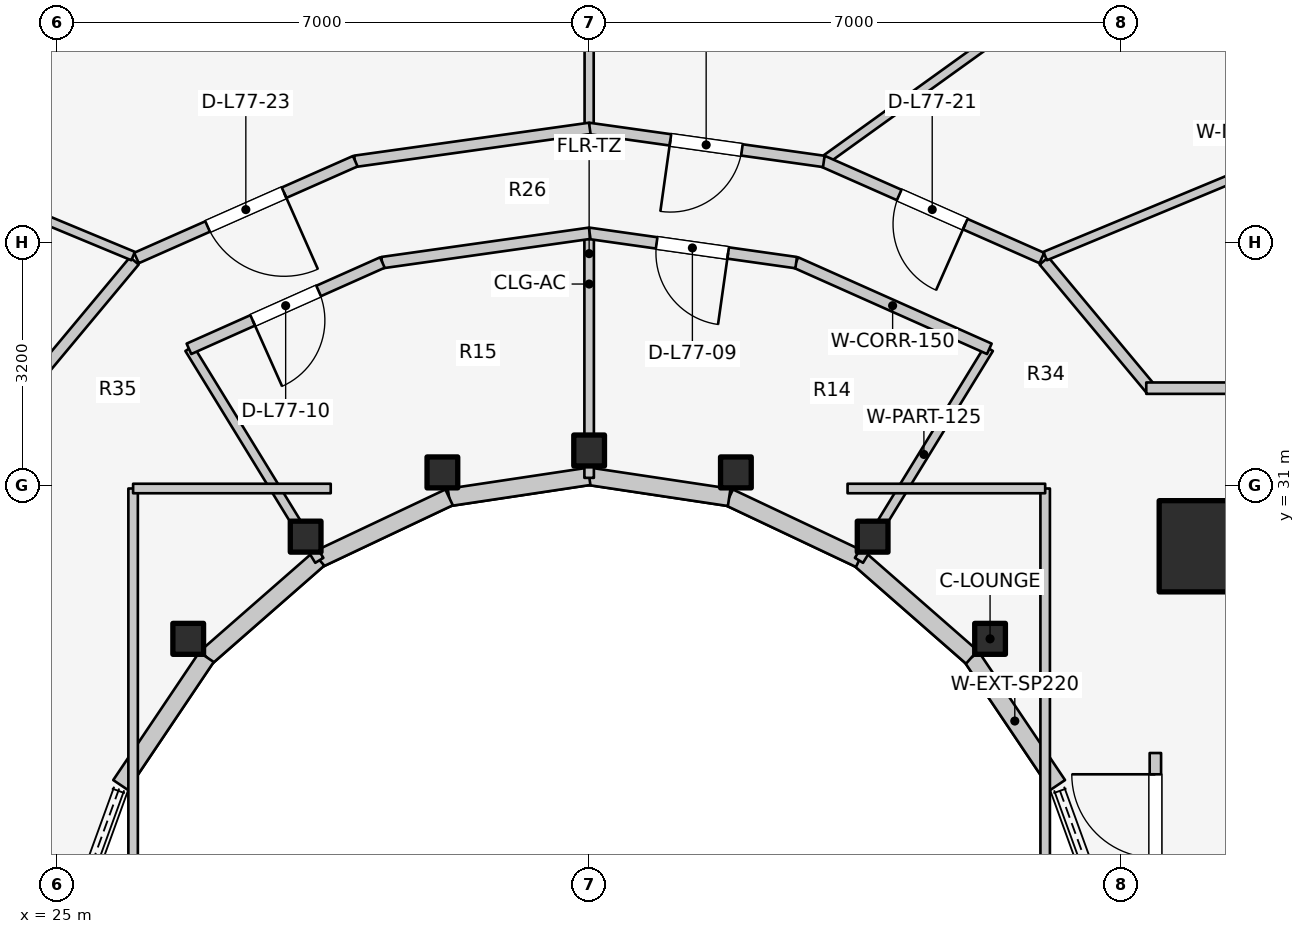
"""IFC4 building model, lengths in metres.
Left out: names, types, materials, properties, quantities, classifications, styles, units other than length and angle.
Written with IfcOpenShell. Run it as: python <this file> out.ifc"""

import sys

from ifc_helpers import new_model, si_unit, direction, frame, frame_2d, origin, origin_2d, place, context, subcontext, project, spatial, rectangle, i_section, extrude, element, fill, save


model = new_model("IFC4")
c1 = context("Model", 3, precision=1e-05, world=origin(), true_north=direction((0.0, 1.0)))
c2 = subcontext(c1, "Body", "Model", "MODEL_VIEW")
j1 = project(units=[si_unit("LENGTHUNIT", "METRE"), si_unit("PLANEANGLEUNIT", "RADIAN")], contexts=[c1])
p1 = place(None, origin())
s1 = spatial("IfcSite", under=j1, at=p1, CompositionType="ELEMENT")
p2 = place(p1, origin())
s2 = spatial("IfcBuilding", under=s1, at=p2, CompositionType="ELEMENT")
p3 = place(p2, frame((0.0, 0.0, 253.2)))
s3 = spatial("IfcBuildingStorey", under=s2, at=p3, CompositionType="ELEMENT", Elevation=253.2)
p4 = place(p3, frame((39.85, 30.35, 0.0), z_axis=(0.0, 0.0, 1.0), x_axis=(1.0, 0.0, 0.0)))
e1 = element("IfcWall", 1, at=p4, inside=s3, PredefinedType="SHEAR", context=c2, shape_type="SweptSolid", body=[
    extrude(rectangle(XDim=4.5, YDim=0.45, at=frame_2d((2.25, 0.0))), origin(), (0.0, 0.0, 1.0), 3.6),
])
p5 = place(p3, frame((40.1, 30.2, 0.0), z_axis=(0.0, 0.0, 1.0), x_axis=(1.0, 0.0, 0.0)))
e2 = element("IfcColumn", 2, at=p5, inside=s3, PredefinedType="COLUMN", context=c2, shape_type="SweptSolid", body=[
    extrude(rectangle(XDim=1.2, YDim=1.2, at=origin_2d()), origin(), (0.0, 0.0, 1.0), 3.6),
])
for number, where, z_axis, x_axis in (
    (3, (37.275, 28.982, 0.0), (0.0, 0.0, 1.0), (1.0, 0.0, 0.0)),
    (4, (35.73, 30.327, 0.0), (0.0, 0.0, 1.0), (1.0, 0.0, 0.0)),
    (5, (33.931, 31.172, 0.0), (0.0, 0.0, 1.0), (1.0, 0.0, 0.0)),
    (6, (32.0, 31.46, 0.0), (0.0, 0.0, 1.0), (1.0, 0.0, 0.0)),
    (7, (30.069, 31.172, 0.0), (0.0, 0.0, 1.0), (1.0, 0.0, 0.0)),
    (8, (28.27, 30.327, 0.0), (0.0, 0.0, 1.0), (1.0, 0.0, 0.0)),
    (9, (26.725, 28.982, 0.0), (0.0, 0.0, 1.0), (1.0, 0.0, 0.0)),
):
    element("IfcColumn", number, at=place(p3, frame(where, z_axis=z_axis, x_axis=x_axis)), inside=s3, PredefinedType="COLUMN", context=c2, shape_type="SweptSolid", body=[
        extrude(i_section(OverallWidth=0.404, OverallDepth=0.407, WebThickness=0.027, FlangeThickness=0.044, FilletRadius=0.025, at=origin_2d()), origin(), (0.0, 0.0, 1.0), 3.6),
    ])
p6 = place(p3, frame((38.166, 27.06, 0.0), z_axis=(0.0, 0.0, 1.0), x_axis=(-0.558197800898, 0.829707909492, 0.0)))
e10 = element("IfcWall", 10, at=p6, inside=s3, PredefinedType="STANDARD", context=c2, shape_type="SweptSolid", body=[
    extrude(rectangle(XDim=2.027, YDim=0.23, at=frame_2d((1.013, 0.0))), origin(), (0.0, 0.0, 1.0), 2.6),
])
p7 = place(p3, frame((37.035, 28.742, 0.0), z_axis=(0.0, 0.0, 1.0), x_axis=(-0.752576694707, 0.658504607869, 0.0)))
e11 = element("IfcWall", 11, at=p7, inside=s3, PredefinedType="STANDARD", context=c2, shape_type="SweptSolid", body=[
    extrude(rectangle(XDim=1.959, YDim=0.23, at=frame_2d((0.98, 0.0))), origin(), (0.0, 0.0, 1.0), 2.6),
])
p8 = place(p3, frame((35.56, 30.032, 0.0), z_axis=(0.0, 0.0, 1.0), x_axis=(-0.904179699603, 0.427152280606, 0.0)))
e12 = element("IfcWall", 12, at=p8, inside=s3, PredefinedType="STANDARD", context=c2, shape_type="SweptSolid", body=[
    extrude(rectangle(XDim=1.899, YDim=0.23, at=frame_2d((0.95, 0.0))), origin(), (0.0, 0.0, 1.0), 2.6),
])
for number, where, z_axis, x_axis in (
    (13, (33.843, 30.843, 0.0), (0.0, 0.0, 1.0), (-0.989, 0.149, 0.0)),
    (14, (32.0, 31.12, 0.0), (0.0, 0.0, 1.0), (-0.989, -0.149, 0.0)),
):
    element("IfcWall", number, at=place(p3, frame(where, z_axis=z_axis, x_axis=x_axis)), inside=s3, PredefinedType="STANDARD", context=c2, shape_type="SweptSolid", body=[
        extrude(rectangle(XDim=1.864, YDim=0.23, at=frame_2d((0.932, 0.0))), origin(), (0.0, 0.0, 1.0), 2.6),
    ])
p9 = place(p3, frame((30.157, 30.843, 0.0), z_axis=(0.0, 0.0, 1.0), x_axis=(-0.904179699603, -0.427152280606, 0.0)))
e15 = element("IfcWall", 15, at=p9, inside=s3, PredefinedType="STANDARD", context=c2, shape_type="SweptSolid", body=[
    extrude(rectangle(XDim=1.899, YDim=0.23, at=frame_2d((0.95, 0.0))), origin(), (0.0, 0.0, 1.0), 2.6),
])
p10 = place(p3, frame((28.44, 30.032, 0.0), z_axis=(0.0, 0.0, 1.0), x_axis=(-0.752576694707, -0.658504607869, 0.0)))
e16 = element("IfcWall", 16, at=p10, inside=s3, PredefinedType="STANDARD", context=c2, shape_type="SweptSolid", body=[
    extrude(rectangle(XDim=1.959, YDim=0.23, at=frame_2d((0.98, 0.0))), origin(), (0.0, 0.0, 1.0), 2.6),
])
p11 = place(p3, frame((26.965, 28.742, 0.0), z_axis=(0.0, 0.0, 1.0), x_axis=(-0.558197800898, -0.829707909492, 0.0)))
e17 = element("IfcWall", 17, at=p11, inside=s3, PredefinedType="STANDARD", context=c2, shape_type="SweptSolid", body=[
    extrude(rectangle(XDim=2.027, YDim=0.23, at=frame_2d((1.013, 0.0))), origin(), (0.0, 0.0, 1.0), 2.6),
])
p12 = place(p3, frame((39.45, 24.08, 0.0), z_axis=(0.0, 0.0, 1.0), x_axis=(0.0, 1.0, 0.0)))
e18 = element("IfcWall", 18, at=p12, inside=s3, PredefinedType="PARTITIONING", context=c2, shape_type="SweptSolid", body=[
    extrude(rectangle(XDim=3.4, YDim=0.15, at=frame_2d((1.7, 0.0))), origin(), (0.0, 0.0, 1.0), 3.295),
])
p13 = place(p12, frame((2.02, 0.0, 0.0)))
e19 = element("IfcOpeningElement", 19, at=p13, cuts=e18, PredefinedType="OPENING", context=c2, shape_type="SweptSolid", body=[
    extrude(rectangle(XDim=1.1, YDim=2.1, at=frame_2d((0.55, 1.05))), frame((0.0, 0.085, 0.0), z_axis=(0.0, -1.0, 0.0), x_axis=(1.0, 0.0, 0.0)), (0.0, 0.0, 1.0), 0.17),
])
p14 = place(p3, frame((35.55, 30.015, 0.0), z_axis=(0.0, 0.0, 1.0), x_axis=(0.522763432117, 0.852477796802, 0.0)))
e20 = element("IfcWall", 20, at=p14, inside=s3, PredefinedType="PARTITIONING", context=c2, shape_type="SweptSolid", body=[
    extrude(rectangle(XDim=3.269, YDim=0.125, at=frame_2d((1.635, 0.0))), origin(), (0.0, 0.0, 1.0), 2.672),
])
p15 = place(p3, frame((32.0, 31.1, 0.0), z_axis=(0.0, 0.0, 1.0), x_axis=(0.0, 1.0, 0.0)))
e21 = element("IfcWall", 21, at=p15, inside=s3, PredefinedType="PARTITIONING", context=c2, shape_type="SweptSolid", body=[
    extrude(rectangle(XDim=3.218, YDim=0.125, at=frame_2d((1.609, 0.0))), origin(), (0.0, 0.0, 1.0), 2.672),
])
p16 = place(p3, frame((28.45, 30.015, 0.0), z_axis=(0.0, 0.0, 1.0), x_axis=(-0.522763432117, 0.852477796802, 0.0)))
e22 = element("IfcWall", 22, at=p16, inside=s3, PredefinedType="PARTITIONING", context=c2, shape_type="SweptSolid", body=[
    extrude(rectangle(XDim=3.269, YDim=0.125, at=frame_2d((1.635, 0.0))), origin(), (0.0, 0.0, 1.0), 2.672),
])
p17 = place(p3, frame((37.265, 32.798, 0.0), z_axis=(0.0, 0.0, 1.0), x_axis=(-0.913254317828, 0.407389924971, 0.0)))
e23 = element("IfcWall", 23, at=p17, inside=s3, PredefinedType="PARTITIONING", context=c2, shape_type="SweptSolid", body=[
    extrude(rectangle(XDim=2.787, YDim=0.15, at=frame_2d((1.393, 0.0))), origin(), (0.0, 0.0, 1.0), 2.823),
])
p18 = place(p3, frame((34.724, 33.932, 0.0), z_axis=(0.0, 0.0, 1.0), x_axis=(-0.990150268487, 0.140008734782, 0.0)))
e24 = element("IfcWall", 24, at=p18, inside=s3, PredefinedType="PARTITIONING", context=c2, shape_type="SweptSolid", body=[
    extrude(rectangle(XDim=2.759, YDim=0.15, at=frame_2d((1.379, 0.0))), origin(), (0.0, 0.0, 1.0), 2.823),
])
p19 = place(p18, frame((0.904, 0.0, 0.0)))
e25 = element("IfcOpeningElement", 25, at=p19, cuts=e24, PredefinedType="OPENING", context=c2, shape_type="SweptSolid", body=[
    extrude(rectangle(XDim=0.95, YDim=2.1, at=frame_2d((0.475, 1.05))), frame((0.0, 0.085, 0.0), z_axis=(0.0, -1.0, 0.0), x_axis=(1.0, 0.0, 0.0)), (0.0, 0.0, 1.0), 0.17),
])
p20 = place(p3, frame((32.007, 34.318, 0.0), z_axis=(0.0, 0.0, 1.0), x_axis=(-0.990150268487, -0.140008734782, 0.0)))
e26 = element("IfcWall", 26, at=p20, inside=s3, PredefinedType="PARTITIONING", context=c2, shape_type="SweptSolid", body=[
    extrude(rectangle(XDim=2.759, YDim=0.15, at=frame_2d((1.379, 0.0))), origin(), (0.0, 0.0, 1.0), 2.823),
])
p21 = place(p3, frame((29.28, 33.933, 0.0), z_axis=(0.0, 0.0, 1.0), x_axis=(-0.913254317828, -0.407389924971, 0.0)))
e27 = element("IfcWall", 27, at=p21, inside=s3, PredefinedType="PARTITIONING", context=c2, shape_type="SweptSolid", body=[
    extrude(rectangle(XDim=2.787, YDim=0.15, at=frame_2d((1.393, 0.0))), origin(), (0.0, 0.0, 1.0), 2.823),
])
p22 = place(p21, frame((0.918, 0.0, 0.0)))
e28 = element("IfcOpeningElement", 28, at=p22, cuts=e27, PredefinedType="OPENING", context=c2, shape_type="SweptSolid", body=[
    extrude(rectangle(XDim=0.95, YDim=2.1, at=frame_2d((0.475, 1.05))), frame((0.0, 0.085, 0.0), z_axis=(0.0, -1.0, 0.0), x_axis=(1.0, 0.0, 0.0)), (0.0, 0.0, 1.0), 0.17),
])
p23 = place(p3, frame((26.0, 25.8, 0.0), z_axis=(0.0, 0.0, 1.0), x_axis=(0.0, 1.0, 0.0)))
e29 = element("IfcWall", 29, at=p23, inside=s3, PredefinedType="PARTITIONING", context=c2, shape_type="SweptSolid", body=[
    extrude(rectangle(XDim=5.16, YDim=0.125, at=frame_2d((2.58, 0.0))), origin(), (0.0, 0.0, 1.0), 2.672),
])
p24 = place(p3, frame((26.0, 30.96, 0.0), z_axis=(0.0, 0.0, 1.0), x_axis=(1.0, 0.0, 0.0)))
e30 = element("IfcWall", 30, at=p24, inside=s3, PredefinedType="PARTITIONING", context=c2, shape_type="SweptSolid", body=[
    extrude(rectangle(XDim=2.6, YDim=0.125, at=frame_2d((1.3, 0.0))), origin(), (0.0, 0.0, 1.0), 2.816),
])
p25 = place(p3, frame((38.0, 25.8, 0.0), z_axis=(0.0, 0.0, 1.0), x_axis=(0.0, 1.0, 0.0)))
e31 = element("IfcWall", 31, at=p25, inside=s3, PredefinedType="PARTITIONING", context=c2, shape_type="SweptSolid", body=[
    extrude(rectangle(XDim=5.16, YDim=0.125, at=frame_2d((2.58, 0.0))), origin(), (0.0, 0.0, 1.0), 2.672),
])
p26 = place(p3, frame((35.4, 30.96, 0.0), z_axis=(0.0, 0.0, 1.0), x_axis=(1.0, 0.0, 0.0)))
e32 = element("IfcWall", 32, at=p26, inside=s3, PredefinedType="PARTITIONING", context=c2, shape_type="SweptSolid", body=[
    extrude(rectangle(XDim=2.6, YDim=0.125, at=frame_2d((1.3, 0.0))), origin(), (0.0, 0.0, 1.0), 2.816),
])
p27 = place(p3, frame((37.984, 33.955, 0.0), z_axis=(0.0, 0.0, 1.0), x_axis=(0.64030392053, -0.76812166312, 0.0)))
e33 = element("IfcWall", 33, at=p27, inside=s3, PredefinedType="PARTITIONING", context=c2, shape_type="SweptSolid", body=[
    extrude(rectangle(XDim=2.21, YDim=0.15, at=frame_2d((1.105, 0.0))), origin(), (0.0, 0.0, 1.0), 2.816),
])
p28 = place(p3, frame((39.33, 32.28, 0.0), z_axis=(0.0, 0.0, 1.0), x_axis=(1.0, 0.0, 0.0)))
e34 = element("IfcWall", 34, at=p28, inside=s3, PredefinedType="PARTITIONING", context=c2, shape_type="SweptSolid", body=[
    extrude(rectangle(XDim=7.52, YDim=0.15, at=frame_2d((3.76, 0.0))), origin(), (0.0, 0.0, 1.0), 2.816),
])
p29 = place(p28, frame((5.22, 0.0, 0.0)))
e35 = element("IfcOpeningElement", 35, at=p29, cuts=e34, PredefinedType="OPENING", context=c2, shape_type="SweptSolid", body=[
    extrude(rectangle(XDim=0.9, YDim=2.1, at=frame_2d((0.45, 1.05))), frame((0.0, 0.085, 0.0), z_axis=(0.0, -1.0, 0.0), x_axis=(1.0, 0.0, 0.0)), (0.0, 0.0, 1.0), 0.17),
])
p30 = place(p3, frame((26.016, 33.955, 0.0), z_axis=(0.0, 0.0, 1.0), x_axis=(-0.64030392053, -0.76812166312, 0.0)))
e36 = element("IfcWall", 36, at=p30, inside=s3, PredefinedType="PARTITIONING", context=c2, shape_type="SweptSolid", body=[
    extrude(rectangle(XDim=2.21, YDim=0.15, at=frame_2d((1.105, 0.0))), origin(), (0.0, 0.0, 1.0), 2.816),
])
p31 = place(p3, frame((38.0, 34.018, 0.0), z_axis=(0.0, 0.0, 1.0), x_axis=(0.92349333748, 0.383614462228, 0.0)))
e37 = element("IfcWall", 37, at=p31, inside=s3, PredefinedType="MOVABLE", context=c2, shape_type="SweptSolid", body=[
    extrude(rectangle(XDim=5.907, YDim=0.12, at=frame_2d((2.954, 0.0))), origin(), (0.0, 0.0, 1.0), 2.66),
])
p32 = place(p3, frame((35.124, 35.297, 0.0), z_axis=(0.0, 0.0, 1.0), x_axis=(0.811745719064, 0.584011033783, 0.0)))
e38 = element("IfcWall", 38, at=p32, inside=s3, PredefinedType="MOVABLE", context=c2, shape_type="SweptSolid", body=[
    extrude(rectangle(XDim=4.534, YDim=0.12, at=frame_2d((2.267, 0.0))), origin(), (0.0, 0.0, 1.0), 2.66),
])
p33 = place(p3, frame((32.0, 35.753, 0.0), z_axis=(0.0, 0.0, 1.0), x_axis=(0.0, 1.0, 0.0)))
e39 = element("IfcWall", 39, at=p33, inside=s3, PredefinedType="MOVABLE", context=c2, shape_type="SweptSolid", body=[
    extrude(rectangle(XDim=2.727, YDim=0.12, at=frame_2d((1.364, 0.0))), origin(), (0.0, 0.0, 1.0), 2.66),
])
p34 = place(p3, frame((26.0, 34.018, 0.0), z_axis=(0.0, 0.0, 1.0), x_axis=(-0.92349333748, 0.383614462228, 0.0)))
e40 = element("IfcWall", 40, at=p34, inside=s3, PredefinedType="MOVABLE", context=c2, shape_type="SweptSolid", body=[
    extrude(rectangle(XDim=5.907, YDim=0.12, at=frame_2d((2.954, 0.0))), origin(), (0.0, 0.0, 1.0), 2.66),
])
p35 = place(p3, frame((37.956, 33.992, 0.0), z_axis=(0.0, 0.0, 1.0), x_axis=(-0.914642679993, 0.404263240891, 0.0)))
e41 = element("IfcWall", 41, at=p35, inside=s3, PredefinedType="PARTITIONING", context=c2, shape_type="SweptSolid", body=[
    extrude(rectangle(XDim=3.154, YDim=0.15, at=frame_2d((1.577, 0.0))), origin(), (0.0, 0.0, 1.0), 2.823),
])
p36 = place(p35, frame((1.102, 0.0, 0.0)))
e42 = element("IfcOpeningElement", 42, at=p36, cuts=e41, PredefinedType="OPENING", context=c2, shape_type="SweptSolid", body=[
    extrude(rectangle(XDim=0.95, YDim=2.1, at=frame_2d((0.475, 1.05))), frame((0.0, 0.085, 0.0), z_axis=(0.0, -1.0, 0.0), x_axis=(1.0, 0.0, 0.0)), (0.0, 0.0, 1.0), 0.17),
])
p37 = place(p3, frame((35.087, 35.263, 0.0), z_axis=(0.0, 0.0, 1.0), x_axis=(-0.990268690673, 0.139168675614, 0.0)))
e43 = element("IfcWall", 43, at=p37, inside=s3, PredefinedType="PARTITIONING", context=c2, shape_type="SweptSolid", body=[
    extrude(rectangle(XDim=3.126, YDim=0.15, at=frame_2d((1.563, 0.0))), origin(), (0.0, 0.0, 1.0), 2.823),
])
p38 = place(p37, frame((1.088, 0.0, 0.0)))
e44 = element("IfcOpeningElement", 44, at=p38, cuts=e43, PredefinedType="OPENING", context=c2, shape_type="SweptSolid", body=[
    extrude(rectangle(XDim=0.95, YDim=2.1, at=frame_2d((0.475, 1.05))), frame((0.0, 0.085, 0.0), z_axis=(0.0, -1.0, 0.0), x_axis=(1.0, 0.0, 0.0)), (0.0, 0.0, 1.0), 0.17),
])
p39 = place(p3, frame((32.008, 35.698, 0.0), z_axis=(0.0, 0.0, 1.0), x_axis=(-0.990317017221, -0.138824368909, 0.0)))
e45 = element("IfcWall", 45, at=p39, inside=s3, PredefinedType="PARTITIONING", context=c2, shape_type="SweptSolid", body=[
    extrude(rectangle(XDim=3.12, YDim=0.15, at=frame_2d((1.56, 0.0))), origin(), (0.0, 0.0, 1.0), 2.823),
])
p40 = place(p3, frame((28.923, 35.266, 0.0), z_axis=(0.0, 0.0, 1.0), x_axis=(-0.914526509772, -0.404525973115, 0.0)))
e46 = element("IfcWall", 46, at=p40, inside=s3, PredefinedType="PARTITIONING", context=c2, shape_type="SweptSolid", body=[
    extrude(rectangle(XDim=3.148, YDim=0.15, at=frame_2d((1.574, 0.0))), origin(), (0.0, 0.0, 1.0), 2.823),
])
p41 = place(p40, frame((1.024, 0.0, 0.0)))
e47 = element("IfcOpeningElement", 47, at=p41, cuts=e46, PredefinedType="OPENING", context=c2, shape_type="SweptSolid", body=[
    extrude(rectangle(XDim=1.1, YDim=2.1, at=frame_2d((0.55, 1.05))), frame((0.0, 0.085, 0.0), z_axis=(0.0, -1.0, 0.0), x_axis=(1.0, 0.0, 0.0)), (0.0, 0.0, 1.0), 0.17),
])
p42 = place(p13, origin())
e48 = element("IfcDoor", 48, at=p42, inside=s3, OperationType="SINGLE_SWING_RIGHT", PredefinedType="DOOR", context=c2, shape_type="SweptSolid", body=[
    extrude(rectangle(XDim=1.1, YDim=2.1, at=frame_2d((0.55, 1.05))), frame((0.0, 0.025, 0.0), z_axis=(0.0, -1.0, 0.0), x_axis=(1.0, 0.0, 0.0)), (0.0, 0.0, 1.0), 0.05),
])
fill(e19, e48)
p43 = place(p19, origin())
e49 = element("IfcDoor", 49, at=p43, inside=s3, OperationType="SINGLE_SWING_LEFT", PredefinedType="DOOR", context=c2, shape_type="SweptSolid", body=[
    extrude(rectangle(XDim=0.95, YDim=2.1, at=frame_2d((0.475, 1.05))), frame((0.0, 0.025, 0.0), z_axis=(0.0, -1.0, 0.0), x_axis=(1.0, 0.0, 0.0)), (0.0, 0.0, 1.0), 0.05),
])
fill(e25, e49)
p44 = place(p22, origin())
e50 = element("IfcDoor", 50, at=p44, inside=s3, OperationType="SINGLE_SWING_RIGHT", PredefinedType="DOOR", context=c2, shape_type="SweptSolid", body=[
    extrude(rectangle(XDim=0.95, YDim=2.1, at=frame_2d((0.475, 1.05))), frame((0.0, 0.025, 0.0), z_axis=(0.0, -1.0, 0.0), x_axis=(1.0, 0.0, 0.0)), (0.0, 0.0, 1.0), 0.05),
])
fill(e28, e50)
p45 = place(p36, origin())
e51 = element("IfcDoor", 51, at=p45, inside=s3, OperationType="SINGLE_SWING_LEFT", PredefinedType="DOOR", context=c2, shape_type="SweptSolid", body=[
    extrude(rectangle(XDim=0.95, YDim=2.1, at=frame_2d((0.475, 1.05))), frame((0.0, 0.025, 0.0), z_axis=(0.0, -1.0, 0.0), x_axis=(1.0, 0.0, 0.0)), (0.0, 0.0, 1.0), 0.05),
])
fill(e42, e51)
p46 = place(p38, origin())
e52 = element("IfcDoor", 52, at=p46, inside=s3, OperationType="SINGLE_SWING_RIGHT", PredefinedType="DOOR", context=c2, shape_type="SweptSolid", body=[
    extrude(rectangle(XDim=0.95, YDim=2.1, at=frame_2d((0.475, 1.05))), frame((0.0, 0.025, 0.0), z_axis=(0.0, -1.0, 0.0), x_axis=(1.0, 0.0, 0.0)), (0.0, 0.0, 1.0), 0.05),
])
fill(e44, e52)
p47 = place(p41, origin())
e53 = element("IfcDoor", 53, at=p47, inside=s3, OperationType="SINGLE_SWING_LEFT", PredefinedType="DOOR", context=c2, shape_type="SweptSolid", body=[
    extrude(rectangle(XDim=1.1, YDim=2.1, at=frame_2d((0.55, 1.05))), frame((0.0, 0.025, 0.0), z_axis=(0.0, -1.0, 0.0), x_axis=(1.0, 0.0, 0.0)), (0.0, 0.0, 1.0), 0.05),
])
fill(e47, e53)
save(model, sys.argv[1])
